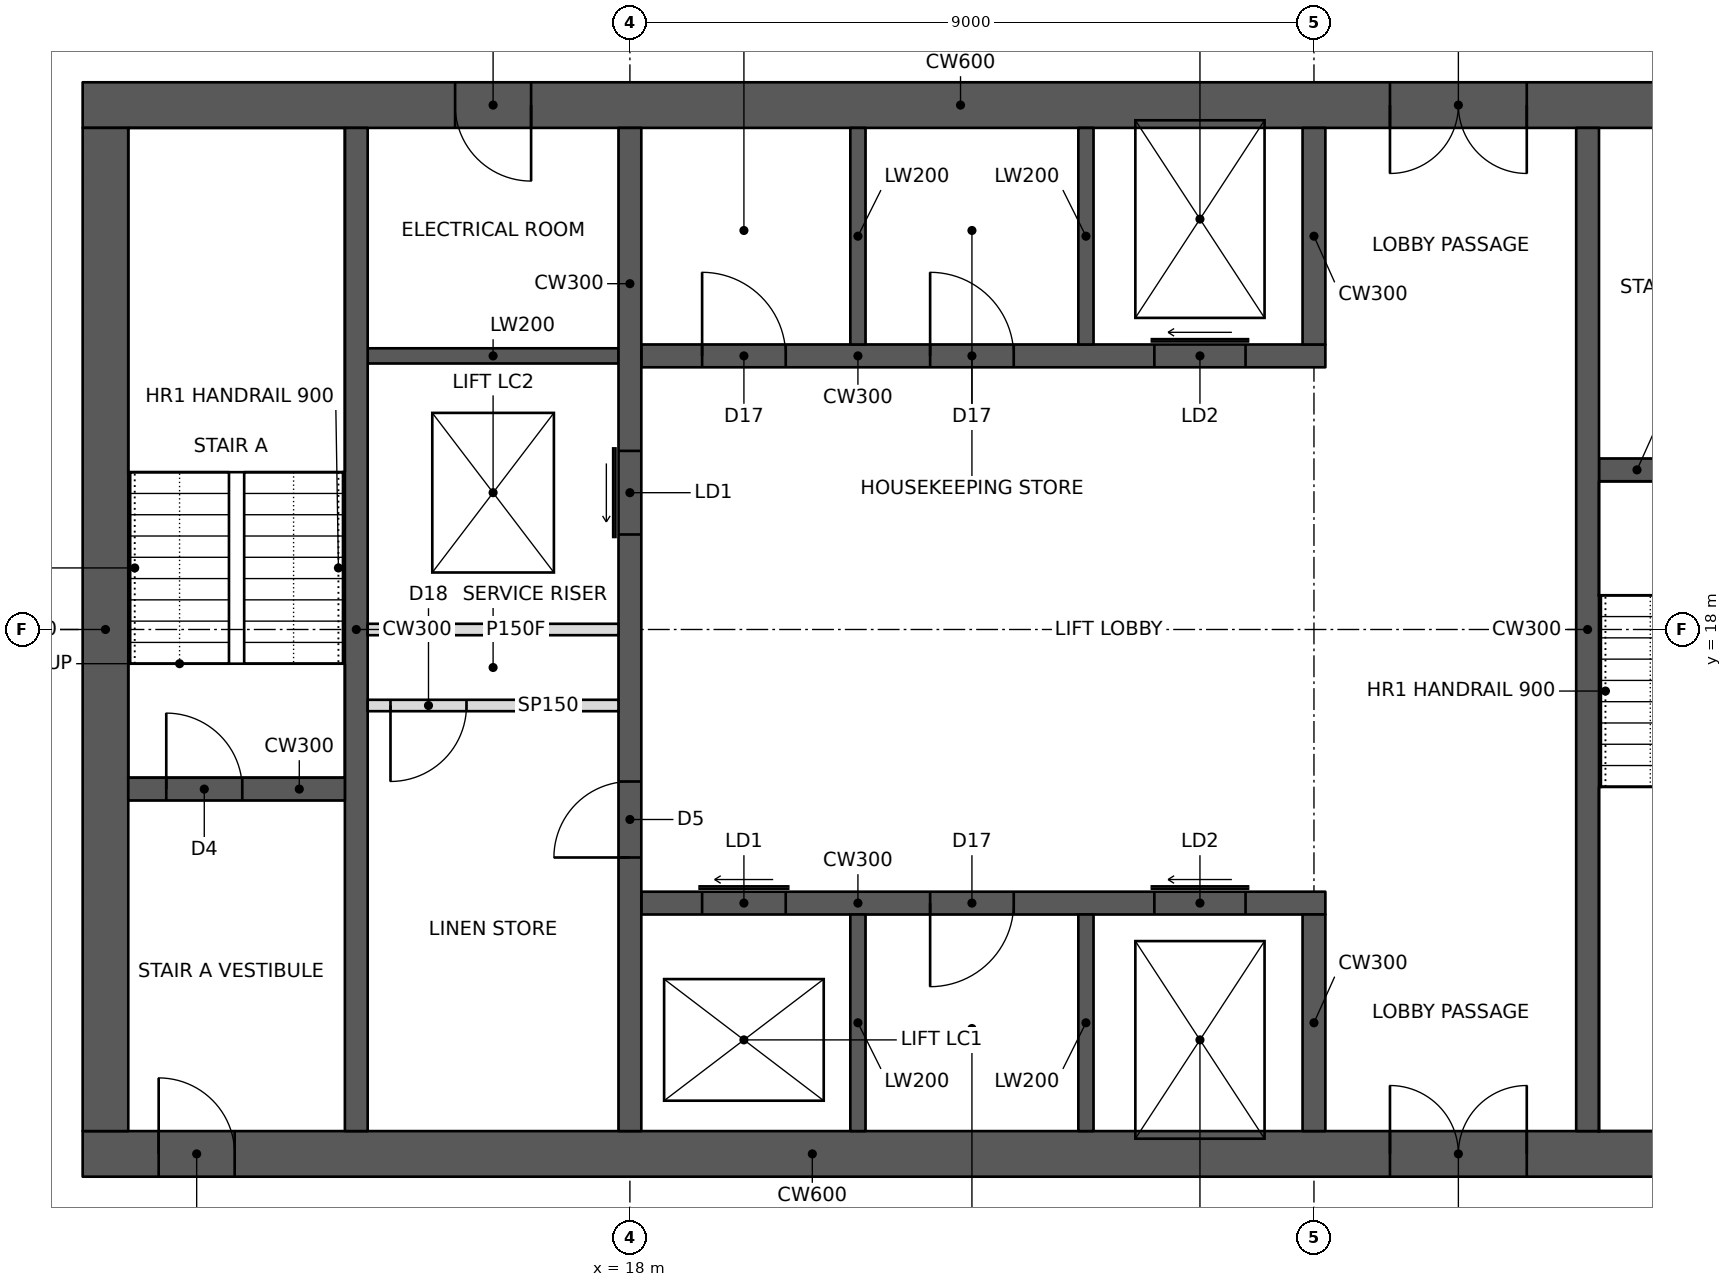
"""IFC4 building model, lengths in metres.
Left out: names, types, materials, properties, quantities, classifications, styles, units other than length and angle.
Written with IfcOpenShell. Run it as: python <this file> out.ifc"""

import sys

from ifc_helpers import new_model, si_unit, direction, frame, frame_2d, origin, place, context, subcontext, project, spatial, rectangle, extrude, element, fill, save


model = new_model("IFC4")
c1 = context("Model", 3, precision=1e-05, world=origin(), true_north=direction((0.0, 1.0)))
c2 = subcontext(c1, "Body", "Model", "MODEL_VIEW")
j1 = project(units=[si_unit("LENGTHUNIT", "METRE"), si_unit("PLANEANGLEUNIT", "RADIAN")], contexts=[c1])
p1 = place(None, origin())
s1 = spatial("IfcSite", under=j1, at=p1, CompositionType="ELEMENT")
p2 = place(p1, origin())
s2 = spatial("IfcBuilding", under=s1, at=p2, CompositionType="ELEMENT")
p3 = place(p2, frame((0.0, 0.0, 174.0)))
s3 = spatial("IfcBuildingStorey", under=s2, at=p3, CompositionType="ELEMENT", Elevation=174.0)
p4 = place(p3, frame((10.8, 11.1, 0.0), z_axis=(0.0, 0.0, 1.0), x_axis=(1.0, 0.0, 0.0)))
e1 = element("IfcWall", 1, at=p4, inside=s3, PredefinedType="SHEAR", context=c2, shape_type="SweptSolid", body=[
    extrude(rectangle(XDim=23.4, YDim=0.6, at=frame_2d((11.7, 0.0))), origin(), (0.0, 0.0, 1.0), 3.4),
])
p5 = place(p4, frame((1.0, 0.0, 0.0)))
e2 = element("IfcOpeningElement", 2, at=p5, cuts=e1, PredefinedType="OPENING", context=c2, shape_type="SweptSolid", body=[
    extrude(rectangle(XDim=1.0, YDim=2.1, at=frame_2d((0.5, 1.05))), frame((0.0, 0.31, 0.0), z_axis=(0.0, -1.0, 0.0), x_axis=(1.0, 0.0, 0.0)), (0.0, 0.0, 1.0), 0.62),
])
p6 = place(p4, frame((17.2, 0.0, 0.0)))
e3 = element("IfcOpeningElement", 3, at=p6, cuts=e1, PredefinedType="OPENING", context=c2, shape_type="SweptSolid", body=[
    extrude(rectangle(XDim=1.8, YDim=2.1, at=frame_2d((0.9, 1.05))), frame((0.0, 0.31, 0.0), z_axis=(0.0, -1.0, 0.0), x_axis=(1.0, 0.0, 0.0)), (0.0, 0.0, 1.0), 0.62),
])
p7 = place(p3, frame((10.8, 24.9, 0.0), z_axis=(0.0, 0.0, 1.0), x_axis=(1.0, 0.0, 0.0)))
e4 = element("IfcWall", 4, at=p7, inside=s3, PredefinedType="SHEAR", context=c2, shape_type="SweptSolid", body=[
    extrude(rectangle(XDim=23.4, YDim=0.6, at=frame_2d((11.7, 0.0))), origin(), (0.0, 0.0, 1.0), 3.4),
])
p8 = place(p7, frame((17.2, 0.0, 0.0)))
e5 = element("IfcOpeningElement", 5, at=p8, cuts=e4, PredefinedType="OPENING", context=c2, shape_type="SweptSolid", body=[
    extrude(rectangle(XDim=1.8, YDim=2.1, at=frame_2d((0.9, 1.05))), frame((0.0, 0.31, 0.0), z_axis=(0.0, -1.0, 0.0), x_axis=(1.0, 0.0, 0.0)), (0.0, 0.0, 1.0), 0.62),
])
p9 = place(p7, frame((21.1, 0.0, 0.0)))
e6 = element("IfcOpeningElement", 6, at=p9, cuts=e4, PredefinedType="OPENING", context=c2, shape_type="SweptSolid", body=[
    extrude(rectangle(XDim=1.0, YDim=2.1, at=frame_2d((0.5, 1.05))), frame((0.0, 0.31, 0.0), z_axis=(0.0, -1.0, 0.0), x_axis=(1.0, 0.0, 0.0)), (0.0, 0.0, 1.0), 0.62),
])
p10 = place(p7, frame((4.9, 0.0, 0.0)))
e7 = element("IfcOpeningElement", 7, at=p10, cuts=e4, PredefinedType="OPENING", context=c2, shape_type="SweptSolid", body=[
    extrude(rectangle(XDim=1.0, YDim=2.1, at=frame_2d((0.5, 1.05))), frame((0.0, 0.31, 0.0), z_axis=(0.0, -1.0, 0.0), x_axis=(1.0, 0.0, 0.0)), (0.0, 0.0, 1.0), 0.62),
])
p11 = place(p3, frame((11.1, 11.4, 0.0), z_axis=(0.0, 0.0, 1.0), x_axis=(0.0, 1.0, 0.0)))
e8 = element("IfcWall", 8, at=p11, inside=s3, PredefinedType="SHEAR", context=c2, shape_type="SweptSolid", body=[
    extrude(rectangle(XDim=13.2, YDim=0.6, at=frame_2d((6.6, 0.0))), origin(), (0.0, 0.0, 1.0), 3.4),
])
p12 = place(p3, frame((14.4, 11.4, 0.0), z_axis=(0.0, 0.0, 1.0), x_axis=(0.0, 1.0, 0.0)))
e9 = element("IfcWall", 9, at=p12, inside=s3, PredefinedType="SHEAR", context=c2, shape_type="SweptSolid", body=[
    extrude(rectangle(XDim=13.2, YDim=0.3, at=frame_2d((6.6, 0.0))), origin(), (0.0, 0.0, 1.0), 3.4),
])
p13 = place(p3, frame((11.4, 15.9, 0.0), z_axis=(0.0, 0.0, 1.0), x_axis=(1.0, 0.0, 0.0)))
e10 = element("IfcWall", 10, at=p13, inside=s3, PredefinedType="SHEAR", context=c2, shape_type="SweptSolid", body=[
    extrude(rectangle(XDim=2.85, YDim=0.3, at=frame_2d((1.425, 0.0))), origin(), (0.0, 0.0, 1.0), 3.4),
])
p14 = place(p13, frame((0.5, 0.0, 0.0)))
e11 = element("IfcOpeningElement", 11, at=p14, cuts=e10, PredefinedType="OPENING", context=c2, shape_type="SweptSolid", body=[
    extrude(rectangle(XDim=1.0, YDim=2.1, at=frame_2d((0.5, 1.05))), frame((0.0, 0.16, 0.0), z_axis=(0.0, -1.0, 0.0), x_axis=(1.0, 0.0, 0.0)), (0.0, 0.0, 1.0), 0.32),
])
p15 = place(p3, frame((18.0, 11.4, 0.0), z_axis=(0.0, 0.0, 1.0), x_axis=(0.0, 1.0, 0.0)))
e12 = element("IfcWall", 12, at=p15, inside=s3, PredefinedType="SHEAR", context=c2, shape_type="SweptSolid", body=[
    extrude(rectangle(XDim=13.2, YDim=0.3, at=frame_2d((6.6, 0.0))), origin(), (0.0, 0.0, 1.0), 3.4),
])
p16 = place(p15, frame((3.6, 0.0, 0.0)))
e13 = element("IfcOpeningElement", 13, at=p16, cuts=e12, PredefinedType="OPENING", context=c2, shape_type="SweptSolid", body=[
    extrude(rectangle(XDim=1.0, YDim=2.1, at=frame_2d((0.5, 1.05))), frame((0.0, 0.16, 0.0), z_axis=(0.0, -1.0, 0.0), x_axis=(1.0, 0.0, 0.0)), (0.0, 0.0, 1.0), 0.32),
])
p17 = place(p15, frame((7.85, 0.0, 0.0)))
e14 = element("IfcOpeningElement", 14, at=p17, cuts=e12, PredefinedType="OPENING", context=c2, shape_type="SweptSolid", body=[
    extrude(rectangle(XDim=1.1, YDim=2.1, at=frame_2d((0.55, 1.05))), frame((0.0, 0.16, 0.0), z_axis=(0.0, -1.0, 0.0), x_axis=(1.0, 0.0, 0.0)), (0.0, 0.0, 1.0), 0.32),
])
p18 = place(p3, frame((14.55, 18.0, 0.0), z_axis=(0.0, 0.0, 1.0), x_axis=(1.0, 0.0, 0.0)))
e15 = element("IfcWall", 15, at=p18, inside=s3, PredefinedType="PARTITIONING", context=c2, shape_type="SweptSolid", body=[
    extrude(rectangle(XDim=3.3, YDim=0.15, at=frame_2d((1.65, 0.0))), origin(), (0.0, 0.0, 1.0), 3.2),
])
p19 = place(p3, frame((18.15, 14.4, 0.0), z_axis=(0.0, 0.0, 1.0), x_axis=(1.0, 0.0, 0.0)))
e16 = element("IfcWall", 16, at=p19, inside=s3, PredefinedType="SHEAR", context=c2, shape_type="SweptSolid", body=[
    extrude(rectangle(XDim=9.0, YDim=0.3, at=frame_2d((4.5, 0.0))), origin(), (0.0, 0.0, 1.0), 3.4),
])
p20 = place(p19, frame((0.8, 0.0, 0.0)))
e17 = element("IfcOpeningElement", 17, at=p20, cuts=e16, PredefinedType="OPENING", context=c2, shape_type="SweptSolid", body=[
    extrude(rectangle(XDim=1.1, YDim=2.1, at=frame_2d((0.55, 1.05))), frame((0.0, 0.16, 0.0), z_axis=(0.0, -1.0, 0.0), x_axis=(1.0, 0.0, 0.0)), (0.0, 0.0, 1.0), 0.32),
])
p21 = place(p19, frame((6.75, 0.0, 0.0)))
e18 = element("IfcOpeningElement", 18, at=p21, cuts=e16, PredefinedType="OPENING", context=c2, shape_type="SweptSolid", body=[
    extrude(rectangle(XDim=1.2, YDim=2.1, at=frame_2d((0.6, 1.05))), frame((0.0, 0.16, 0.0), z_axis=(0.0, -1.0, 0.0), x_axis=(1.0, 0.0, 0.0)), (0.0, 0.0, 1.0), 0.32),
])
p22 = place(p19, frame((3.8, 0.0, 0.0)))
e19 = element("IfcOpeningElement", 19, at=p22, cuts=e16, PredefinedType="OPENING", context=c2, shape_type="SweptSolid", body=[
    extrude(rectangle(XDim=1.1, YDim=2.1, at=frame_2d((0.55, 1.05))), frame((0.0, 0.16, 0.0), z_axis=(0.0, -1.0, 0.0), x_axis=(1.0, 0.0, 0.0)), (0.0, 0.0, 1.0), 0.32),
])
p23 = place(p3, frame((27.0, 11.4, 0.0), z_axis=(0.0, 0.0, 1.0), x_axis=(0.0, 1.0, 0.0)))
e20 = element("IfcWall", 20, at=p23, inside=s3, PredefinedType="SHEAR", context=c2, shape_type="SweptSolid", body=[
    extrude(rectangle(XDim=2.85, YDim=0.3, at=frame_2d((1.425, 0.0))), origin(), (0.0, 0.0, 1.0), 3.4),
])
for number, where, z_axis, x_axis in (
    (21, (21.0, 11.4, 0.0), (0.0, 0.0, 1.0), (0.0, 1.0, 0.0)),
    (22, (24.0, 11.4, 0.0), (0.0, 0.0, 1.0), (0.0, 1.0, 0.0)),
):
    element("IfcWall", number, at=place(p3, frame(where, z_axis=z_axis, x_axis=x_axis)), inside=s3, PredefinedType="SHEAR", context=c2, shape_type="SweptSolid", body=[
        extrude(rectangle(XDim=2.85, YDim=0.2, at=frame_2d((1.425, 0.0))), origin(), (0.0, 0.0, 1.0), 3.4),
    ])
p24 = place(p3, frame((18.15, 21.6, 0.0), z_axis=(0.0, 0.0, 1.0), x_axis=(1.0, 0.0, 0.0)))
e23 = element("IfcWall", 23, at=p24, inside=s3, PredefinedType="SHEAR", context=c2, shape_type="SweptSolid", body=[
    extrude(rectangle(XDim=9.0, YDim=0.3, at=frame_2d((4.5, 0.0))), origin(), (0.0, 0.0, 1.0), 3.4),
])
p25 = place(p24, frame((6.75, 0.0, 0.0)))
e24 = element("IfcOpeningElement", 24, at=p25, cuts=e23, PredefinedType="OPENING", context=c2, shape_type="SweptSolid", body=[
    extrude(rectangle(XDim=1.2, YDim=2.1, at=frame_2d((0.6, 1.05))), frame((0.0, 0.16, 0.0), z_axis=(0.0, -1.0, 0.0), x_axis=(1.0, 0.0, 0.0)), (0.0, 0.0, 1.0), 0.32),
])
p26 = place(p24, frame((0.8, 0.0, 0.0)))
e25 = element("IfcOpeningElement", 25, at=p26, cuts=e23, PredefinedType="OPENING", context=c2, shape_type="SweptSolid", body=[
    extrude(rectangle(XDim=1.1, YDim=2.1, at=frame_2d((0.55, 1.05))), frame((0.0, 0.16, 0.0), z_axis=(0.0, -1.0, 0.0), x_axis=(1.0, 0.0, 0.0)), (0.0, 0.0, 1.0), 0.32),
])
p27 = place(p24, frame((3.8, 0.0, 0.0)))
e26 = element("IfcOpeningElement", 26, at=p27, cuts=e23, PredefinedType="OPENING", context=c2, shape_type="SweptSolid", body=[
    extrude(rectangle(XDim=1.1, YDim=2.1, at=frame_2d((0.55, 1.05))), frame((0.0, 0.16, 0.0), z_axis=(0.0, -1.0, 0.0), x_axis=(1.0, 0.0, 0.0)), (0.0, 0.0, 1.0), 0.32),
])
p28 = place(p3, frame((27.0, 21.75, 0.0), z_axis=(0.0, 0.0, 1.0), x_axis=(0.0, 1.0, 0.0)))
e27 = element("IfcWall", 27, at=p28, inside=s3, PredefinedType="SHEAR", context=c2, shape_type="SweptSolid", body=[
    extrude(rectangle(XDim=2.85, YDim=0.3, at=frame_2d((1.425, 0.0))), origin(), (0.0, 0.0, 1.0), 3.4),
])
for number, where, z_axis, x_axis in (
    (28, (21.0, 21.75, 0.0), (0.0, 0.0, 1.0), (0.0, 1.0, 0.0)),
    (29, (24.0, 21.75, 0.0), (0.0, 0.0, 1.0), (0.0, 1.0, 0.0)),
):
    element("IfcWall", number, at=place(p3, frame(where, z_axis=z_axis, x_axis=x_axis)), inside=s3, PredefinedType="SHEAR", context=c2, shape_type="SweptSolid", body=[
        extrude(rectangle(XDim=2.85, YDim=0.2, at=frame_2d((1.425, 0.0))), origin(), (0.0, 0.0, 1.0), 3.4),
    ])
p29 = place(p3, frame((30.6, 11.4, 0.0), z_axis=(0.0, 0.0, 1.0), x_axis=(0.0, 1.0, 0.0)))
e30 = element("IfcWall", 30, at=p29, inside=s3, PredefinedType="SHEAR", context=c2, shape_type="SweptSolid", body=[
    extrude(rectangle(XDim=13.2, YDim=0.3, at=frame_2d((6.6, 0.0))), origin(), (0.0, 0.0, 1.0), 3.4),
])
p30 = place(p3, frame((30.75, 20.1, 0.0), z_axis=(0.0, 0.0, 1.0), x_axis=(1.0, 0.0, 0.0)))
e31 = element("IfcWall", 31, at=p30, inside=s3, PredefinedType="SHEAR", context=c2, shape_type="SweptSolid", body=[
    extrude(rectangle(XDim=2.85, YDim=0.3, at=frame_2d((1.425, 0.0))), origin(), (0.0, 0.0, 1.0), 3.4),
])
p31 = place(p30, frame((1.15, 0.0, 0.0)))
e32 = element("IfcOpeningElement", 32, at=p31, cuts=e31, PredefinedType="OPENING", context=c2, shape_type="SweptSolid", body=[
    extrude(rectangle(XDim=1.0, YDim=2.1, at=frame_2d((0.5, 1.05))), frame((0.0, 0.16, 0.0), z_axis=(0.0, -1.0, 0.0), x_axis=(1.0, 0.0, 0.0)), (0.0, 0.0, 1.0), 0.32),
])
p32 = place(p3, frame((14.55, 21.6, 0.0), z_axis=(0.0, 0.0, 1.0), x_axis=(1.0, 0.0, 0.0)))
e33 = element("IfcWall", 33, at=p32, inside=s3, PredefinedType="SHEAR", context=c2, shape_type="SweptSolid", body=[
    extrude(rectangle(XDim=3.3, YDim=0.2, at=frame_2d((1.65, 0.0))), origin(), (0.0, 0.0, 1.0), 3.4),
])
p33 = place(p3, frame((14.55, 17.0, 0.0), z_axis=(0.0, 0.0, 1.0), x_axis=(1.0, 0.0, 0.0)))
e34 = element("IfcWall", 34, at=p33, inside=s3, PredefinedType="PARTITIONING", context=c2, shape_type="SweptSolid", body=[
    extrude(rectangle(XDim=3.3, YDim=0.15, at=frame_2d((1.65, 0.0))), origin(), (0.0, 0.0, 1.0), 3.2),
])
p34 = place(p33, frame((0.3, 0.0, 0.0)))
e35 = element("IfcOpeningElement", 35, at=p34, cuts=e34, PredefinedType="OPENING", context=c2, shape_type="SweptSolid", body=[
    extrude(rectangle(XDim=1.0, YDim=2.1, at=frame_2d((0.5, 1.05))), frame((0.0, 0.085, 0.0), z_axis=(0.0, -1.0, 0.0), x_axis=(1.0, 0.0, 0.0)), (0.0, 0.0, 1.0), 0.17),
])
p35 = place(p34, frame((1.0, 0.0, 0.0), z_axis=(0.0, 0.0, 1.0), x_axis=(-1.0, 0.0, 0.0)))
e36 = element("IfcDoor", 36, at=p35, inside=s3, OperationType="SINGLE_SWING_RIGHT", PredefinedType="DOOR", context=c2, shape_type="SweptSolid", body=[
    extrude(rectangle(XDim=1.0, YDim=2.1, at=frame_2d((0.5, 1.05))), frame((0.0, 0.025, 0.0), z_axis=(0.0, -1.0, 0.0), x_axis=(1.0, 0.0, 0.0)), (0.0, 0.0, 1.0), 0.05),
])
fill(e35, e36)
p36 = place(p5, origin())
e37 = element("IfcDoor", 37, at=p36, inside=s3, OperationType="SINGLE_SWING_LEFT", PredefinedType="DOOR", context=c2, shape_type="SweptSolid", body=[
    extrude(rectangle(XDim=1.0, YDim=2.1, at=frame_2d((0.5, 1.05))), frame((0.0, 0.025, 0.0), z_axis=(0.0, -1.0, 0.0), x_axis=(1.0, 0.0, 0.0)), (0.0, 0.0, 1.0), 0.05),
])
fill(e2, e37)
p37 = place(p14, origin())
e38 = element("IfcDoor", 38, at=p37, inside=s3, OperationType="SINGLE_SWING_LEFT", PredefinedType="DOOR", context=c2, shape_type="SweptSolid", body=[
    extrude(rectangle(XDim=1.0, YDim=2.1, at=frame_2d((0.5, 1.05))), frame((0.0, 0.025, 0.0), z_axis=(0.0, -1.0, 0.0), x_axis=(1.0, 0.0, 0.0)), (0.0, 0.0, 1.0), 0.05),
])
fill(e11, e38)
p38 = place(p6, origin())
e39 = element("IfcDoor", 39, at=p38, inside=s3, OperationType="DOUBLE_DOOR_SINGLE_SWING", PredefinedType="DOOR", context=c2, shape_type="SweptSolid", body=[
    extrude(rectangle(XDim=1.8, YDim=2.1, at=frame_2d((0.9, 1.05))), frame((0.0, 0.025, 0.0), z_axis=(0.0, -1.0, 0.0), x_axis=(1.0, 0.0, 0.0)), (0.0, 0.0, 1.0), 0.05),
])
fill(e3, e39)
p39 = place(p8, frame((1.8, 0.0, 0.0), z_axis=(0.0, 0.0, 1.0), x_axis=(-1.0, 0.0, 0.0)))
e40 = element("IfcDoor", 40, at=p39, inside=s3, OperationType="DOUBLE_DOOR_SINGLE_SWING", PredefinedType="DOOR", context=c2, shape_type="SweptSolid", body=[
    extrude(rectangle(XDim=1.8, YDim=2.1, at=frame_2d((0.9, 1.05))), frame((0.0, 0.025, 0.0), z_axis=(0.0, -1.0, 0.0), x_axis=(1.0, 0.0, 0.0)), (0.0, 0.0, 1.0), 0.05),
])
fill(e5, e40)
p40 = place(p16, origin())
e41 = element("IfcDoor", 41, at=p40, inside=s3, OperationType="SINGLE_SWING_LEFT", PredefinedType="DOOR", context=c2, shape_type="SweptSolid", body=[
    extrude(rectangle(XDim=1.0, YDim=2.1, at=frame_2d((0.5, 1.05))), frame((0.0, 0.025, 0.0), z_axis=(0.0, -1.0, 0.0), x_axis=(1.0, 0.0, 0.0)), (0.0, 0.0, 1.0), 0.05),
])
fill(e13, e41)
p41 = place(p10, frame((1.0, 0.0, 0.0), z_axis=(0.0, 0.0, 1.0), x_axis=(-1.0, 0.0, 0.0)))
e42 = element("IfcDoor", 42, at=p41, inside=s3, OperationType="SINGLE_SWING_LEFT", PredefinedType="DOOR", context=c2, shape_type="SweptSolid", body=[
    extrude(rectangle(XDim=1.0, YDim=2.1, at=frame_2d((0.5, 1.05))), frame((0.0, 0.025, 0.0), z_axis=(0.0, -1.0, 0.0), x_axis=(1.0, 0.0, 0.0)), (0.0, 0.0, 1.0), 0.05),
])
fill(e7, e42)
p42 = place(p20, origin())
e43 = element("IfcDoor", 43, at=p42, inside=s3, OperationType="SLIDING_TO_LEFT", PredefinedType="DOOR", context=c2, shape_type="SweptSolid", body=[
    extrude(rectangle(XDim=1.1, YDim=2.1, at=frame_2d((0.55, 1.05))), frame((0.0, 0.025, 0.0), z_axis=(0.0, -1.0, 0.0), x_axis=(1.0, 0.0, 0.0)), (0.0, 0.0, 1.0), 0.05),
])
fill(e17, e43)
p43 = place(p17, origin())
e44 = element("IfcDoor", 44, at=p43, inside=s3, OperationType="SLIDING_TO_LEFT", PredefinedType="DOOR", context=c2, shape_type="SweptSolid", body=[
    extrude(rectangle(XDim=1.1, YDim=2.1, at=frame_2d((0.55, 1.05))), frame((0.0, 0.025, 0.0), z_axis=(0.0, -1.0, 0.0), x_axis=(1.0, 0.0, 0.0)), (0.0, 0.0, 1.0), 0.05),
])
fill(e14, e44)
p44 = place(p21, origin())
e45 = element("IfcDoor", 45, at=p44, inside=s3, OperationType="SLIDING_TO_LEFT", PredefinedType="DOOR", context=c2, shape_type="SweptSolid", body=[
    extrude(rectangle(XDim=1.2, YDim=2.1, at=frame_2d((0.6, 1.05))), frame((0.0, 0.025, 0.0), z_axis=(0.0, -1.0, 0.0), x_axis=(1.0, 0.0, 0.0)), (0.0, 0.0, 1.0), 0.05),
])
fill(e18, e45)
p45 = place(p25, origin())
e46 = element("IfcDoor", 46, at=p45, inside=s3, OperationType="SLIDING_TO_LEFT", PredefinedType="DOOR", context=c2, shape_type="SweptSolid", body=[
    extrude(rectangle(XDim=1.2, YDim=2.1, at=frame_2d((0.6, 1.05))), frame((0.0, 0.025, 0.0), z_axis=(0.0, -1.0, 0.0), x_axis=(1.0, 0.0, 0.0)), (0.0, 0.0, 1.0), 0.05),
])
fill(e24, e46)
p46 = place(p26, origin())
e47 = element("IfcDoor", 47, at=p46, inside=s3, OperationType="SINGLE_SWING_LEFT", PredefinedType="DOOR", context=c2, shape_type="SweptSolid", body=[
    extrude(rectangle(XDim=1.1, YDim=2.1, at=frame_2d((0.55, 1.05))), frame((0.0, 0.025, 0.0), z_axis=(0.0, -1.0, 0.0), x_axis=(1.0, 0.0, 0.0)), (0.0, 0.0, 1.0), 0.05),
])
fill(e25, e47)
p47 = place(p27, origin())
e48 = element("IfcDoor", 48, at=p47, inside=s3, OperationType="SINGLE_SWING_LEFT", PredefinedType="DOOR", context=c2, shape_type="SweptSolid", body=[
    extrude(rectangle(XDim=1.1, YDim=2.1, at=frame_2d((0.55, 1.05))), frame((0.0, 0.025, 0.0), z_axis=(0.0, -1.0, 0.0), x_axis=(1.0, 0.0, 0.0)), (0.0, 0.0, 1.0), 0.05),
])
fill(e26, e48)
p48 = place(p22, frame((1.1, 0.0, 0.0), z_axis=(0.0, 0.0, 1.0), x_axis=(-1.0, 0.0, 0.0)))
e49 = element("IfcDoor", 49, at=p48, inside=s3, OperationType="SINGLE_SWING_RIGHT", PredefinedType="DOOR", context=c2, shape_type="SweptSolid", body=[
    extrude(rectangle(XDim=1.1, YDim=2.1, at=frame_2d((0.55, 1.05))), frame((0.0, 0.025, 0.0), z_axis=(0.0, -1.0, 0.0), x_axis=(1.0, 0.0, 0.0)), (0.0, 0.0, 1.0), 0.05),
])
fill(e19, e49)
save(model, sys.argv[1])
